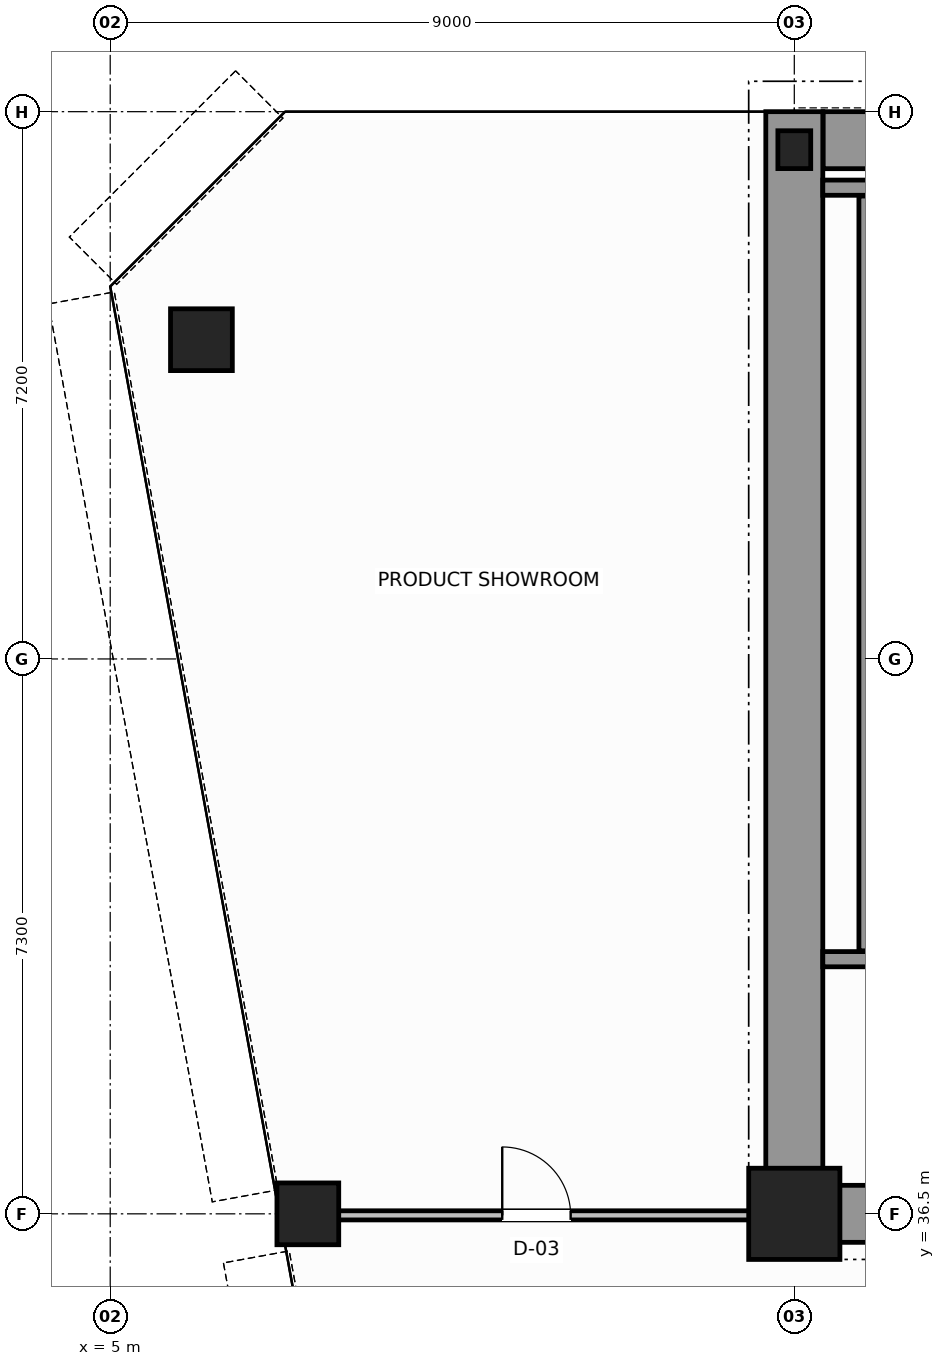
"""IFC4 building model, lengths in metres.
Left out: names, types, materials, properties, quantities, classifications, styles, units other than length and angle.
Written with IfcOpenShell. Run it as: python <this file> out.ifc"""

import sys

from ifc_helpers import new_model, si_unit, direction, frame, frame_2d, origin, origin_2d, place, context, subcontext, project, spatial, rectangle, hollow_circle, i_section, extrude, source, transform, mapped, element, fill, save


model = new_model("IFC4")
c1 = context("Model", 3, precision=1e-05, world=origin(), true_north=direction((0.0, 1.0)))
c2 = subcontext(c1, "Body", "Model", "MODEL_VIEW")
j1 = project(units=[si_unit("LENGTHUNIT", "METRE"), si_unit("PLANEANGLEUNIT", "RADIAN")], contexts=[c1])
p1 = place(None, origin())
s1 = spatial("IfcSite", under=j1, at=p1, CompositionType="ELEMENT")
p2 = place(p1, origin())
s2 = spatial("IfcBuilding", under=s1, at=p2, CompositionType="ELEMENT")
p3 = place(p2, frame((0.0, 0.0, 161.4)))
s3 = spatial("IfcBuildingStorey", under=s2, at=p3, CompositionType="ELEMENT", Elevation=161.4)
m1 = source(origin(), c2, "Body", "SweptSolid", [
    extrude(rectangle(XDim=1.2, YDim=1.2, at=origin_2d()), origin(), (0.0, 0.0, 1.0), 3.8),
])
p4 = place(p3, frame((14.0, 36.5, 0.0), z_axis=(0.0, 0.0, 1.0), x_axis=(1.0, 0.0, 0.0)))
e1 = element("IfcColumn", 1, at=p4, inside=s3, PredefinedType="COLUMN", context=c2, shape_type="MappedRepresentation", body=[
    mapped(m1, transform((0.0, 0.0, 0.0), scale=1.0)),
])
m2 = source(origin(), c2, "Body", "SweptSolid", [
    extrude(i_section(OverallWidth=0.432, OverallDepth=0.498, WebThickness=0.055, FlangeThickness=0.068, FilletRadius=0.015, at=origin_2d()), origin(), (0.0, 0.0, 1.0), 3.8),
])
p5 = place(p3, frame((14.0, 50.5, 0.0), z_axis=(0.0, 0.0, 1.0), x_axis=(1.0, 0.0, 0.0)))
e2 = element("IfcColumn", 2, at=p5, inside=s3, PredefinedType="COLUMN", context=c2, shape_type="MappedRepresentation", body=[
    mapped(m2, transform((0.0, 0.0, 0.0), scale=1.0)),
])
m3 = source(origin(), c2, "Body", "SweptSolid", [
    extrude(hollow_circle(Radius=0.406, WallThickness=0.04, at=origin_2d()), origin(), (0.0, 0.0, 1.0), 3.8),
])
for number, where, z_axis, x_axis in (
    (3, (6.2, 48.0, 0.0), (0.0, 0.0, 1.0), (1.0, 0.0, 0.0)),
    (4, (7.6, 36.5, 0.0), (0.0, 0.0, 1.0), (1.0, 0.0, 0.0)),
):
    element("IfcColumn", number, at=place(p3, frame(where, z_axis=z_axis, x_axis=x_axis)), inside=s3, PredefinedType="COLUMN", context=c2, shape_type="MappedRepresentation", body=[
        mapped(m3, transform((0.0, 0.0, 0.0), scale=1.0)),
    ])
p6 = place(p3, frame((14.379, 50.625, 0.0), z_axis=(0.0, 0.0, 1.0), x_axis=(1.0, 0.0, 0.0)))
e5 = element("IfcWall", 5, at=p6, inside=s3, PredefinedType="SHEAR", context=c2, shape_type="SweptSolid", body=[
    extrude(rectangle(XDim=19.619, YDim=0.75, at=frame_2d((9.81, 0.0))), origin(), (0.0, 0.0, 1.0), 3.8),
])
p7 = place(p3, frame((14.0, 36.5, 0.0), z_axis=(0.0, 0.0, 1.0), x_axis=(0.0, 1.0, 0.0)))
e6 = element("IfcWall", 6, at=p7, inside=s3, PredefinedType="SHEAR", context=c2, shape_type="SweptSolid", body=[
    extrude(rectangle(XDim=14.5, YDim=0.75, at=frame_2d((7.25, 0.0))), origin(), (0.0, 0.0, 1.0), 3.8),
])
p8 = place(p3, frame((14.395, 36.5, 0.0), z_axis=(0.0, 0.0, 1.0), x_axis=(1.0, 0.0, 0.0)))
e7 = element("IfcWall", 7, at=p8, inside=s3, PredefinedType="SHEAR", context=c2, shape_type="SweptSolid", body=[
    extrude(rectangle(XDim=3.805, YDim=0.75, at=frame_2d((1.902, 0.0))), origin(), (0.0, 0.0, 1.0), 2.38),
])
p9 = place(p3, frame((14.375, 39.85, 0.0), z_axis=(0.0, 0.0, 1.0), x_axis=(1.0, 0.0, 0.0)))
e8 = element("IfcWall", 8, at=p9, inside=s3, PredefinedType="SOLIDWALL", context=c2, shape_type="SweptSolid", body=[
    extrude(rectangle(XDim=4.225, YDim=0.2, at=frame_2d((2.113, 0.0))), origin(), (0.0, 0.0, 1.0), 3.8),
])
p10 = place(p9, frame((1.8, 0.0, 0.0)))
e9 = element("IfcOpeningElement", 9, at=p10, cuts=e8, PredefinedType="OPENING", context=c2, shape_type="SweptSolid", body=[
    extrude(rectangle(XDim=1.1, YDim=2.15, at=frame_2d((0.55, 1.075))), frame((0.0, 0.11, 0.0), z_axis=(0.0, -1.0, 0.0), x_axis=(1.0, 0.0, 0.0)), (0.0, 0.0, 1.0), 0.22),
])
p11 = place(p3, frame((14.375, 50.0, 0.0), z_axis=(0.0, 0.0, 1.0), x_axis=(1.0, 0.0, 0.0)))
e10 = element("IfcWall", 10, at=p11, inside=s3, PredefinedType="SOLIDWALL", context=c2, shape_type="SweptSolid", body=[
    extrude(rectangle(XDim=4.225, YDim=0.2, at=frame_2d((2.113, 0.0))), origin(), (0.0, 0.0, 1.0), 3.8),
])
p12 = place(p3, frame((14.95, 39.96, 0.0), z_axis=(0.0, 0.0, 1.0), x_axis=(0.0, 1.0, 0.0)))
e11 = element("IfcWall", 11, at=p12, inside=s3, PredefinedType="SOLIDWALL", context=c2, shape_type="SweptSolid", body=[
    extrude(rectangle(XDim=9.93, YDim=0.2, at=frame_2d((4.965, 0.0))), origin(), (0.0, 0.0, 1.0), 3.8),
])
p13 = place(p3, frame((7.274, 36.48, 0.0), z_axis=(0.0, 0.0, 1.0), x_axis=(1.0, 0.0, 0.0)))
e12 = element("IfcWall", 12, at=p13, inside=s3, PredefinedType="PARTITIONING", context=c2, shape_type="SweptSolid", body=[
    extrude(rectangle(XDim=6.666, YDim=0.12, at=frame_2d((3.333, 0.0))), origin(), (0.0, 0.0, 1.0), 2.97),
])
p14 = place(p13, frame((2.883, 0.0, 0.0)))
e13 = element("IfcOpeningElement", 13, at=p14, cuts=e12, PredefinedType="OPENING", context=c2, shape_type="SweptSolid", body=[
    extrude(rectangle(XDim=0.9, YDim=2.15, at=frame_2d((0.45, 1.075))), frame((0.0, 0.07, 0.0), z_axis=(0.0, -1.0, 0.0), x_axis=(1.0, 0.0, 0.0)), (0.0, 0.0, 1.0), 0.14),
])
m4 = source(origin(), c2, "Body", "SweptSolid", [
    extrude(rectangle(XDim=0.9, YDim=2.15, at=frame_2d((0.45, 1.075))), frame((0.0, 0.025, 0.0), z_axis=(0.0, -1.0, 0.0), x_axis=(1.0, 0.0, 0.0)), (0.0, 0.0, 1.0), 0.05),
])
p15 = place(p14, origin())
e14 = element("IfcDoor", 14, at=p15, inside=s3, OperationType="SINGLE_SWING_LEFT", PredefinedType="DOOR", context=c2, shape_type="MappedRepresentation", body=[
    mapped(m4, transform((0.0, 0.0, 0.0), scale=1.0)),
])
fill(e13, e14)
save(model, sys.argv[1])
